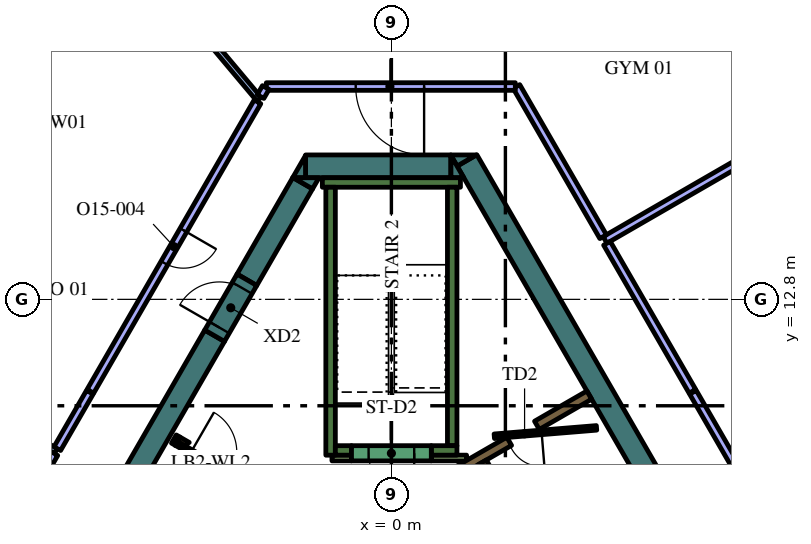
"""IFC4 building model, lengths in metres.
Left out: names, types, materials, properties, quantities, classifications, styles, units other than length and angle.
Written with IfcOpenShell. Run it as: python <this file> out.ifc"""

import sys

from ifc_helpers import new_model, si_unit, direction, frame, frame_2d, origin, place, context, subcontext, project, spatial, polyline, rectangle, outline, extrude, element, fill, save


model = new_model("IFC4")
c1 = context("Model", 3, precision=1e-05, world=origin(), true_north=direction((0.0, 1.0)))
c2 = subcontext(c1, "Body", "Model", "MODEL_VIEW")
j1 = project(units=[si_unit("LENGTHUNIT", "METRE"), si_unit("PLANEANGLEUNIT", "RADIAN")], contexts=[c1])
p1 = place(None, origin())
s1 = spatial("IfcSite", under=j1, at=p1, CompositionType="ELEMENT")
p2 = place(p1, origin())
s2 = spatial("IfcBuilding", under=s1, at=p2, CompositionType="ELEMENT")
p3 = place(p2, frame((0.0, 0.0, 317.4)))
s3 = spatial("IfcBuildingStorey", under=s2, at=p3, CompositionType="ELEMENT", Elevation=317.4)
p4 = place(p3, frame((1.989, 16.456, 0.0), z_axis=(0.0, 0.0, 1.0), x_axis=(0.49999102663, -0.8660305845, 0.0)))
e1 = element("IfcWall", 1, at=p4, inside=s3, PredefinedType="SOLIDWALL", context=c2, shape_type="SweptSolid", body=[
    extrude(rectangle(XDim=12.406, YDim=0.6, at=frame_2d((6.203, 0.0))), origin(), (0.0, 0.0, 1.0), 4.2),
])
p5 = place(p3, origin())
e2 = element("IfcWall", 2, at=p5, inside=s3, PredefinedType="SOLIDWALL", context=c2, shape_type="SweptSolid", body=[
    extrude(outline(polyline([(1.559, 16.6), (2.235, 16.6), (1.728, 16.307), (1.559, 16.6)])), origin(), (0.0, 0.0, 1.0), 4.2),
])
p6 = place(p3, frame((-2.258, 16.3, 0.0), z_axis=(0.0, 0.0, 1.0), x_axis=(1.0, 0.0, 0.0)))
e3 = element("IfcWall", 3, at=p6, inside=s3, PredefinedType="SOLIDWALL", context=c2, shape_type="SweptSolid", body=[
    extrude(rectangle(XDim=3.823, YDim=0.6, at=frame_2d((1.912, 0.0))), origin(), (0.0, 0.0, 1.0), 4.2),
])
e4 = element("IfcWall", 4, at=p5, inside=s3, PredefinedType="SOLIDWALL", context=c2, shape_type="SweptSolid", body=[
    extrude(outline(polyline([(1.905, 16.0), (1.567, 16.0), (1.567, 16.585), (1.905, 16.0)])), origin(), (0.0, 0.0, 1.0), 4.2),
])
e5 = element("IfcWall", 5, at=p5, inside=s3, PredefinedType="SOLIDWALL", context=c2, shape_type="SweptSolid", body=[
    extrude(outline(polyline([(-2.598, 16.0), (-2.26, 16.585), (-2.26, 16.0), (-2.598, 16.0)])), origin(), (0.0, 0.0, 1.0), 4.2),
])
p7 = place(p3, frame((-2.335, 15.855, 0.0), z_axis=(0.0, 0.0, 1.0), x_axis=(-0.499960127962, -0.866048422692, 0.0)))
e6 = element("IfcWall", 6, at=p7, inside=s3, PredefinedType="SOLIDWALL", context=c2, shape_type="SweptSolid", body=[
    extrude(rectangle(XDim=2.934, YDim=0.6, at=frame_2d((1.467, 0.0))), origin(), (0.0, 0.0, 1.0), 4.2),
])
e7 = element("IfcWall", 7, at=p5, inside=s3, PredefinedType="SOLIDWALL", context=c2, shape_type="SweptSolid", body=[
    extrude(outline(polyline([(-1.905, 16.0), (-2.074, 15.707), (-2.581, 16.0), (-1.905, 16.0)])), origin(), (0.0, 0.0, 1.0), 4.2),
])
p8 = place(p3, frame((-12.582, -1.892, 0.0), z_axis=(0.0, 0.0, 1.0), x_axis=(0.500003640647, 0.866023301845, 0.0)))
e8 = element("IfcWall", 8, at=p8, inside=s3, PredefinedType="SOLIDWALL", context=c2, shape_type="SweptSolid", body=[
    extrude(rectangle(XDim=15.858, YDim=0.6, at=frame_2d((7.929, 0.0))), origin(), (0.0, 0.0, 1.0), 4.2),
])
p9 = place(p3, frame((-1.817, 15.875, 0.0), z_axis=(0.0, 0.0, 1.0), x_axis=(1.0, 0.0, 0.0)))
e9 = element("IfcWall", 9, at=p9, inside=s3, PredefinedType="SOLIDWALL", context=c2, shape_type="SweptSolid", body=[
    extrude(rectangle(XDim=3.634, YDim=0.25, at=frame_2d((1.817, 0.0))), origin(), (0.0, 0.0, 1.0), 4.2),
])
p10 = place(p3, frame((1.6, 8.95, 0.0), z_axis=(0.0, 0.0, 1.0), x_axis=(0.0, 1.0, 0.0)))
e10 = element("IfcWall", 10, at=p10, inside=s3, PredefinedType="SOLIDWALL", context=c2, shape_type="SweptSolid", body=[
    extrude(rectangle(XDim=6.8, YDim=0.25, at=frame_2d((3.4, 0.0))), origin(), (0.0, 0.0, 1.0), 4.2),
])
p11 = place(p3, frame((1.05, 8.825, 0.0), z_axis=(0.0, 0.0, 1.0), x_axis=(1.0, 0.0, 0.0)))
e11 = element("IfcWall", 11, at=p11, inside=s3, PredefinedType="SOLIDWALL", context=c2, shape_type="SweptSolid", body=[
    extrude(rectangle(XDim=0.675, YDim=0.25, at=frame_2d((0.337, 0.0))), origin(), (0.0, 0.0, 1.0), 4.2),
])
p12 = place(p3, frame((-1.6, 8.7, 0.0), z_axis=(0.0, 0.0, 1.0), x_axis=(0.0, 1.0, 0.0)))
e12 = element("IfcWall", 12, at=p12, inside=s3, PredefinedType="SOLIDWALL", context=c2, shape_type="SweptSolid", body=[
    extrude(rectangle(XDim=7.05, YDim=0.25, at=frame_2d((3.525, 0.0))), origin(), (0.0, 0.0, 1.0), 4.2),
])
p13 = place(p3, frame((-1.475, 8.825, 0.0), z_axis=(0.0, 0.0, 1.0), x_axis=(1.0, 0.0, 0.0)))
e13 = element("IfcWall", 13, at=p13, inside=s3, PredefinedType="SOLIDWALL", context=c2, shape_type="SweptSolid", body=[
    extrude(rectangle(XDim=0.425, YDim=0.25, at=frame_2d((0.212, 0.0))), origin(), (0.0, 0.0, 1.0), 4.2),
])
p14 = place(p3, frame((3.1, 9.064, 0.0), z_axis=(0.0, 0.0, 1.0), x_axis=(-0.866030133475, -0.499991807846, 0.0)))
e14 = element("IfcWall", 14, at=p14, inside=s3, PredefinedType="SOLIDWALL", context=c2, shape_type="SweptSolid", body=[
    extrude(rectangle(XDim=3.217, YDim=0.25, at=frame_2d((1.608, 0.0))), origin(), (0.0, 0.0, 1.0), 4.2),
])
p15 = place(p3, frame((3.83, 9.486, 0.0), z_axis=(0.0, 0.0, 1.0), x_axis=(0.865986202621, 0.500067892261, 0.0)))
e15 = element("IfcWall", 15, at=p15, inside=s3, PredefinedType="SOLIDWALL", context=c2, shape_type="SweptSolid", body=[
    extrude(rectangle(XDim=1.591, YDim=0.25, at=frame_2d((0.795, 0.0))), origin(), (0.0, 0.0, 1.0), 4.2),
])
p16 = place(p3, frame((-5.725, 9.125, 0.0), z_axis=(0.0, 0.0, 1.0), x_axis=(0.866185586049, -0.49972245349, 0.0)))
e16 = element("IfcWall", 16, at=p16, inside=s3, PredefinedType="SOLIDWALL", context=c2, shape_type="SweptSolid", body=[
    extrude(rectangle(XDim=0.11, YDim=0.25, at=frame_2d((0.055, 0.0))), origin(), (0.0, 0.0, 1.0), 4.2),
])
e17 = element("IfcWall", 17, at=p5, inside=s3, PredefinedType="SOLIDWALL", context=c2, shape_type="SweptSolid", body=[
    extrude(outline(polyline([(-5.689, 8.96), (-5.69, 8.961), (-5.565, 9.177), (-5.319, 9.035), (-5.335, 9.026), (-5.351, 9.015), (-5.366, 9.002), (-5.379, 8.988), (-5.392, 8.972), (-5.402, 8.956), (-5.412, 8.939), (-5.629, 9.064), (-5.629, 9.064), (-5.689, 8.96)])), origin(), (0.0, 0.0, 1.0), 4.2),
])
p17 = place(p3, frame((1.05, 8.625, 0.0), z_axis=(0.0, 0.0, 1.0), x_axis=(1.0, 0.0, 0.0)))
e18 = element("IfcWall", 18, at=p17, inside=s3, PredefinedType="PARTITIONING", context=c2, shape_type="SweptSolid", body=[
    extrude(rectangle(XDim=0.929, YDim=0.15, at=frame_2d((0.464, 0.0))), origin(), (0.0, 0.0, 1.0), 3.5),
])
p18 = place(p3, frame((-1.564, 8.625, 0.0), z_axis=(0.0, 0.0, 1.0), x_axis=(1.0, 0.0, 0.0)))
e19 = element("IfcWall", 19, at=p18, inside=s3, PredefinedType="PARTITIONING", context=c2, shape_type="SweptSolid", body=[
    extrude(rectangle(XDim=0.514, YDim=0.15, at=frame_2d((0.257, 0.0))), origin(), (0.0, 0.0, 1.0), 3.5),
])
p19 = place(p3, frame((8.565, -2.185, 0.0), z_axis=(0.0, 0.0, 1.0), x_axis=(-0.499997954832, 0.866026584559, 0.0)))
e20 = element("IfcWall", 20, at=p19, inside=s3, PredefinedType="SOLIDWALL", context=c2, shape_type="SweptSolid", body=[
    extrude(rectangle(XDim=12.35, YDim=0.25, at=frame_2d((6.175, 0.0))), origin(), (0.0, 0.0, 1.0), 4.2),
])
p20 = place(p19, frame((0.685, 0.0, 0.0)))
e21 = element("IfcOpeningElement", 21, at=p20, cuts=e20, PredefinedType="OPENING", context=c2, shape_type="SweptSolid", body=[
    extrude(rectangle(XDim=0.9, YDim=2.1, at=frame_2d((0.45, 1.05))), frame((0.0, 0.135, 0.0), z_axis=(0.0, -1.0, 0.0), x_axis=(1.0, 0.0, 0.0)), (0.0, 0.0, 1.0), 0.27),
])
p21 = place(p19, frame((3.105, 0.0, 0.0)))
e22 = element("IfcOpeningElement", 22, at=p21, cuts=e20, PredefinedType="OPENING", context=c2, shape_type="SweptSolid", body=[
    extrude(rectangle(XDim=1.1, YDim=2.1, at=frame_2d((0.55, 1.05))), frame((0.0, 0.135, 0.0), z_axis=(0.0, -1.0, 0.0), x_axis=(1.0, 0.0, 0.0)), (0.0, 0.0, 1.0), 0.27),
])
p22 = place(p19, frame((5.625, 0.0, 0.0)))
e23 = element("IfcOpeningElement", 23, at=p22, cuts=e20, PredefinedType="OPENING", context=c2, shape_type="SweptSolid", body=[
    extrude(rectangle(XDim=1.1, YDim=2.1, at=frame_2d((0.55, 1.05))), frame((0.0, 0.135, 0.0), z_axis=(0.0, -1.0, 0.0), x_axis=(1.0, 0.0, 0.0)), (0.0, 0.0, 1.0), 0.27),
])
p23 = place(p19, frame((8.145, 0.0, 0.0)))
e24 = element("IfcOpeningElement", 24, at=p23, cuts=e20, PredefinedType="OPENING", context=c2, shape_type="SweptSolid", body=[
    extrude(rectangle(XDim=1.1, YDim=2.1, at=frame_2d((0.55, 1.05))), frame((0.0, 0.135, 0.0), z_axis=(0.0, -1.0, 0.0), x_axis=(1.0, 0.0, 0.0)), (0.0, 0.0, 1.0), 0.27),
])
p24 = place(p19, frame((10.665, 0.0, 0.0)))
e25 = element("IfcOpeningElement", 25, at=p24, cuts=e20, PredefinedType="OPENING", context=c2, shape_type="SweptSolid", body=[
    extrude(rectangle(XDim=1.1, YDim=2.1, at=frame_2d((0.55, 1.05))), frame((0.0, 0.135, 0.0), z_axis=(0.0, -1.0, 0.0), x_axis=(1.0, 0.0, 0.0)), (0.0, 0.0, 1.0), 0.27),
])
p25 = place(p3, frame((1.05, 8.75, 0.0), z_axis=(0.0, 0.0, 1.0), x_axis=(-1.0, 0.0, 0.0)))
e26 = element("IfcWall", 26, at=p25, inside=s3, PredefinedType="SOLIDWALL", context=c2, shape_type="SweptSolid", body=[
    extrude(rectangle(XDim=2.1, YDim=0.4, at=frame_2d((1.05, 0.0))), origin(), (0.0, 0.0, 1.0), 4.2),
])
p26 = place(p25, frame((0.45, 0.0, 0.0)))
e27 = element("IfcOpeningElement", 27, at=p26, cuts=e26, PredefinedType="OPENING", context=c2, shape_type="SweptSolid", body=[
    extrude(rectangle(XDim=1.2, YDim=2.1, at=frame_2d((0.6, 1.05))), frame((0.0, 0.21, 0.0), z_axis=(0.0, -1.0, 0.0), x_axis=(1.0, 0.0, 0.0)), (0.0, 0.0, 1.0), 0.42),
])
p27 = place(p3, frame((5.398, 9.419, 0.0), z_axis=(0.0, 0.0, 1.0), x_axis=(-0.996653416376, -0.081743303248, 0.0)))
e28 = element("IfcWall", 28, at=p27, inside=s3, PredefinedType="PARTITIONING", context=c2, shape_type="SweptSolid", body=[
    extrude(rectangle(XDim=2.7, YDim=0.12, at=frame_2d((1.35, 0.0))), origin(), (0.0, 0.0, 1.0), 3.5),
])
p28 = place(p27, frame((1.45, 0.0, 0.0)))
e29 = element("IfcOpeningElement", 29, at=p28, cuts=e28, PredefinedType="OPENING", context=c2, shape_type="SweptSolid", body=[
    extrude(rectangle(XDim=0.9, YDim=2.1, at=frame_2d((0.45, 1.05))), frame((0.0, 0.07, 0.0), z_axis=(0.0, -1.0, 0.0), x_axis=(1.0, 0.0, 0.0)), (0.0, 0.0, 1.0), 0.14),
])
p29 = place(p3, frame((-5.659, 9.012, 0.0), z_axis=(0.0, 0.0, 1.0), x_axis=(0.866009402589, -0.500027713859, 0.0)))
e30 = element("IfcWall", 30, at=p29, inside=s3, PredefinedType="PARTITIONING", context=c2, shape_type="SweptSolid", body=[
    extrude(rectangle(XDim=2.1, YDim=0.12, at=frame_2d((1.05, 0.0))), origin(), (0.0, 0.0, 1.0), 3.5),
])
p30 = place(p29, frame((0.45, 0.0, 0.0)))
e31 = element("IfcOpeningElement", 31, at=p30, cuts=e30, PredefinedType="OPENING", context=c2, shape_type="SweptSolid", body=[
    extrude(rectangle(XDim=1.2, YDim=2.1, at=frame_2d((0.6, 1.05))), frame((0.0, 0.07, 0.0), z_axis=(0.0, -1.0, 0.0), x_axis=(1.0, 0.0, 0.0)), (0.0, 0.0, 1.0), 0.14),
])
p31 = place(p3, frame((-4.652, 11.842, 0.0), z_axis=(0.0, 0.0, 1.0), x_axis=(0.500062241894, 0.865989465428, 0.0)))
e32 = element("IfcWall", 32, at=p31, inside=s3, PredefinedType="SOLIDWALL", context=c2, shape_type="SweptSolid", body=[
    extrude(rectangle(XDim=1.7, YDim=0.6, at=frame_2d((0.85, 0.0))), origin(), (0.0, 0.0, 1.0), 4.2),
])
p32 = place(p31, frame((0.25, 0.0, 0.0)))
e33 = element("IfcOpeningElement", 33, at=p32, cuts=e32, PredefinedType="OPENING", context=c2, shape_type="SweptSolid", body=[
    extrude(rectangle(XDim=1.2, YDim=2.1, at=frame_2d((0.6, 1.05))), frame((0.0, 0.31, 0.0), z_axis=(0.0, -1.0, 0.0), x_axis=(1.0, 0.0, 0.0)), (0.0, 0.0, 1.0), 0.62),
])
p33 = place(p3, frame((5.622, 14.363, 0.0), z_axis=(0.0, 0.0, 1.0), x_axis=(0.866030409726, 0.499991329354, 0.0)))
e34 = element("IfcWall", 34, at=p33, inside=s3, PredefinedType="PARTITIONING", context=c2, shape_type="SweptSolid", body=[
    extrude(rectangle(XDim=5.869, YDim=0.2, at=frame_2d((2.934, 0.0))), origin(), (0.0, 0.0, 1.0), 3.5),
])
p34 = place(p3, frame((12.936, 1.695, 0.0), z_axis=(0.0, 0.0, 1.0), x_axis=(-0.500004234368, 0.866022959057, 0.0)))
e35 = element("IfcWall", 35, at=p34, inside=s3, PredefinedType="PARTITIONING", context=c2, shape_type="SweptSolid", body=[
    extrude(rectangle(XDim=10.0, YDim=0.2, at=frame_2d((5.0, 0.0))), origin(), (0.0, 0.0, 1.0), 3.5),
])
p35 = place(p34, frame((4.1, 0.0, 0.0)))
e36 = element("IfcOpeningElement", 36, at=p35, cuts=e35, PredefinedType="OPENING", context=c2, shape_type="SweptSolid", body=[
    extrude(rectangle(XDim=1.8, YDim=2.1, at=frame_2d((0.9, 1.05))), frame((0.0, 0.11, 0.0), z_axis=(0.0, -1.0, 0.0), x_axis=(1.0, 0.0, 0.0)), (0.0, 0.0, 1.0), 0.22),
])
p36 = place(p3, frame((7.921, 10.381, 0.0), z_axis=(0.0, 0.0, 1.0), x_axis=(-0.500021625289, 0.866012918058, 0.0)))
e37 = element("IfcWall", 37, at=p36, inside=s3, PredefinedType="PARTITIONING", context=c2, shape_type="SweptSolid", body=[
    extrude(rectangle(XDim=4.497, YDim=0.2, at=frame_2d((2.249, 0.0))), origin(), (0.0, 0.0, 1.0), 3.5),
])
p37 = place(p3, frame((-3.483, 18.067, 0.0), z_axis=(0.0, 0.0, 1.0), x_axis=(-0.642968046165, 0.765893002717, 0.0)))
e38 = element("IfcWall", 38, at=p37, inside=s3, PredefinedType="PARTITIONING", context=c2, shape_type="SweptSolid", body=[
    extrude(rectangle(XDim=5.47, YDim=0.15, at=frame_2d((2.735, 0.0))), origin(), (0.0, 0.0, 1.0), 3.5),
])
p38 = place(p3, frame((5.572, 14.449, 0.0), z_axis=(0.0, 0.0, 1.0), x_axis=(-0.500012761589, 0.866018035752, 0.0)))
e39 = element("IfcWall", 39, at=p38, inside=s3, PredefinedType="PARTITIONING", context=c2, shape_type="SweptSolid", body=[
    extrude(rectangle(XDim=4.562, YDim=0.2, at=frame_2d((2.281, 0.0))), origin(), (0.0, 0.0, 1.0), 3.5),
])
p39 = place(p3, frame((3.261, 18.4, 0.0), z_axis=(0.0, 0.0, 1.0), x_axis=(-1.0, 0.0, 0.0)))
e40 = element("IfcWall", 40, at=p39, inside=s3, PredefinedType="PARTITIONING", context=c2, shape_type="SweptSolid", body=[
    extrude(rectangle(XDim=6.552, YDim=0.2, at=frame_2d((3.276, 0.0))), origin(), (0.0, 0.0, 1.0), 3.5),
])
p40 = place(p39, frame((2.4, 0.0, 0.0)))
e41 = element("IfcOpeningElement", 41, at=p40, cuts=e40, PredefinedType="OPENING", context=c2, shape_type="SweptSolid", body=[
    extrude(rectangle(XDim=1.8, YDim=2.1, at=frame_2d((0.9, 1.05))), frame((0.0, 0.11, 0.0), z_axis=(0.0, -1.0, 0.0), x_axis=(1.0, 0.0, 0.0)), (0.0, 0.0, 1.0), 0.22),
])
p41 = place(p3, frame((-3.306, 18.374, 0.0), z_axis=(0.0, 0.0, 1.0), x_axis=(-0.500055614084, -0.865993292597, 0.0)))
e42 = element("IfcWall", 42, at=p41, inside=s3, PredefinedType="PARTITIONING", context=c2, shape_type="SweptSolid", body=[
    extrude(rectangle(XDim=0.275, YDim=0.2, at=frame_2d((0.137, 0.0))), origin(), (0.0, 0.0, 1.0), 3.5),
])
p42 = place(p3, frame((-8.829, 8.808, 0.0), z_axis=(0.0, 0.0, 1.0), x_axis=(-0.86603673505, 0.499980373158, 0.0)))
e43 = element("IfcWall", 43, at=p42, inside=s3, PredefinedType="PARTITIONING", context=c2, shape_type="SweptSolid", body=[
    extrude(rectangle(XDim=6.255, YDim=0.15, at=frame_2d((3.127, 0.0))), origin(), (0.0, 0.0, 1.0), 3.5),
])
p43 = place(p3, frame((-7.936, 10.355, 0.0), z_axis=(0.0, 0.0, 1.0), x_axis=(-0.500035209441, -0.86600507465, 0.0)))
e44 = element("IfcWall", 44, at=p43, inside=s3, PredefinedType="PARTITIONING", context=c2, shape_type="SweptSolid", body=[
    extrude(rectangle(XDim=1.712, YDim=0.2, at=frame_2d((0.856, 0.0))), origin(), (0.0, 0.0, 1.0), 3.5),
])
p44 = place(p3, frame((-3.523, 17.998, 0.0), z_axis=(0.0, 0.0, 1.0), x_axis=(-0.499996383721, -0.866027491634, 0.0)))
e45 = element("IfcWall", 45, at=p44, inside=s3, PredefinedType="PARTITIONING", context=c2, shape_type="SweptSolid", body=[
    extrude(rectangle(XDim=8.795, YDim=0.2, at=frame_2d((4.397, 0.0))), origin(), (0.0, 0.0, 1.0), 3.5),
])
p45 = place(p44, frame((3.9, 0.0, 0.0)))
e46 = element("IfcOpeningElement", 46, at=p45, cuts=e45, PredefinedType="OPENING", context=c2, shape_type="SweptSolid", body=[
    extrude(rectangle(XDim=1.0, YDim=2.1, at=frame_2d((0.5, 1.05))), frame((0.0, 0.11, 0.0), z_axis=(0.0, -1.0, 0.0), x_axis=(1.0, 0.0, 0.0)), (0.0, 0.0, 1.0), 0.22),
])
p46 = place(p3, frame((-8.867, 8.743, 0.0), z_axis=(0.0, 0.0, 1.0), x_axis=(-0.499978679558, -0.866037712797, 0.0)))
e47 = element("IfcWall", 47, at=p46, inside=s3, PredefinedType="PARTITIONING", context=c2, shape_type="SweptSolid", body=[
    extrude(rectangle(XDim=8.138, YDim=0.2, at=frame_2d((4.069, 0.0))), origin(), (0.0, 0.0, 1.0), 3.5),
])
p47 = place(p46, frame((3.6, 0.0, 0.0)))
e48 = element("IfcOpeningElement", 48, at=p47, cuts=e47, PredefinedType="OPENING", context=c2, shape_type="SweptSolid", body=[
    extrude(rectangle(XDim=1.0, YDim=2.1, at=frame_2d((0.5, 1.05))), frame((0.0, 0.11, 0.0), z_axis=(0.0, -1.0, 0.0), x_axis=(1.0, 0.0, 0.0)), (0.0, 0.0, 1.0), 0.22),
])
p48 = place(p3, frame((10.938, 17.99, 0.0), z_axis=(0.0, 0.0, 1.0), x_axis=(-0.599559865294, 0.800329911929, 0.0)))
e49 = element("IfcWall", 49, at=p48, inside=s3, PredefinedType="SOLIDWALL", context=c2, shape_type="SweptSolid", body=[
    extrude(rectangle(XDim=5.415, YDim=0.19, at=frame_2d((2.708, 0.0))), origin(), (0.0, 0.0, 1.0), 3.9),
])
p49 = place(p48, frame((0.358, 0.0, 0.6)))
e50 = element("IfcOpeningElement", 50, at=p49, cuts=e49, PredefinedType="OPENING", context=c2, shape_type="SweptSolid", body=[
    extrude(rectangle(XDim=1.5, YDim=2.85, at=frame_2d((0.75, 1.425))), frame((0.0, 0.105, 0.0), z_axis=(0.0, -1.0, 0.0), x_axis=(1.0, 0.0, 0.0)), (0.0, 0.0, 1.0), 0.21),
])
p50 = place(p48, frame((3.593, 0.0, 0.6)))
e51 = element("IfcOpeningElement", 51, at=p50, cuts=e49, PredefinedType="OPENING", context=c2, shape_type="SweptSolid", body=[
    extrude(rectangle(XDim=1.5, YDim=2.85, at=frame_2d((0.75, 1.425))), frame((0.0, 0.105, 0.0), z_axis=(0.0, -1.0, 0.0), x_axis=(1.0, 0.0, 0.0)), (0.0, 0.0, 1.0), 0.21),
])
p51 = place(p3, frame((-7.692, 22.324, 0.0), z_axis=(0.0, 0.0, 1.0), x_axis=(-0.599559865294, -0.800329911929, 0.0)))
e52 = element("IfcWall", 52, at=p51, inside=s3, PredefinedType="SOLIDWALL", context=c2, shape_type="SweptSolid", body=[
    extrude(rectangle(XDim=5.415, YDim=0.19, at=frame_2d((2.708, 0.0))), origin(), (0.0, 0.0, 1.0), 3.9),
])
p52 = place(p51, frame((0.323, 0.0, 0.6)))
e53 = element("IfcOpeningElement", 53, at=p52, cuts=e52, PredefinedType="OPENING", context=c2, shape_type="SweptSolid", body=[
    extrude(rectangle(XDim=1.5, YDim=2.85, at=frame_2d((0.75, 1.425))), frame((0.0, 0.105, 0.0), z_axis=(0.0, -1.0, 0.0), x_axis=(1.0, 0.0, 0.0)), (0.0, 0.0, 1.0), 0.21),
])
p53 = place(p51, frame((3.558, 0.0, 0.6)))
e54 = element("IfcOpeningElement", 54, at=p53, cuts=e52, PredefinedType="OPENING", context=c2, shape_type="SweptSolid", body=[
    extrude(rectangle(XDim=1.5, YDim=2.85, at=frame_2d((0.75, 1.425))), frame((0.0, 0.105, 0.0), z_axis=(0.0, -1.0, 0.0), x_axis=(1.0, 0.0, 0.0)), (0.0, 0.0, 1.0), 0.21),
])
p54 = place(p26, origin())
e55 = element("IfcDoor", 55, at=p54, inside=s3, OperationType="SINGLE_SWING_LEFT", PredefinedType="DOOR", context=c2, shape_type="SweptSolid", body=[
    extrude(rectangle(XDim=1.2, YDim=2.1, at=frame_2d((0.6, 1.05))), frame((0.0, 0.025, 0.0), z_axis=(0.0, -1.0, 0.0), x_axis=(1.0, 0.0, 0.0)), (0.0, 0.0, 1.0), 0.05),
])
fill(e27, e55)
p55 = place(p28, origin())
e56 = element("IfcDoor", 56, at=p55, inside=s3, OperationType="SINGLE_SWING_LEFT", PredefinedType="DOOR", context=c2, shape_type="SweptSolid", body=[
    extrude(rectangle(XDim=0.9, YDim=2.1, at=frame_2d((0.45, 1.05))), frame((0.0, 0.025, 0.0), z_axis=(0.0, -1.0, 0.0), x_axis=(1.0, 0.0, 0.0)), (0.0, 0.0, 1.0), 0.05),
])
fill(e29, e56)
p56 = place(p30, origin())
e57 = element("IfcDoor", 57, at=p56, inside=s3, OperationType="SINGLE_SWING_LEFT", PredefinedType="DOOR", context=c2, shape_type="SweptSolid", body=[
    extrude(rectangle(XDim=1.2, YDim=2.1, at=frame_2d((0.6, 1.05))), frame((0.0, 0.025, 0.0), z_axis=(0.0, -1.0, 0.0), x_axis=(1.0, 0.0, 0.0)), (0.0, 0.0, 1.0), 0.05),
])
fill(e31, e57)
p57 = place(p32, origin())
e58 = element("IfcDoor", 58, at=p57, inside=s3, OperationType="SINGLE_SWING_LEFT", PredefinedType="DOOR", context=c2, shape_type="SweptSolid", body=[
    extrude(rectangle(XDim=1.2, YDim=2.1, at=frame_2d((0.6, 1.05))), frame((0.0, 0.025, 0.0), z_axis=(0.0, -1.0, 0.0), x_axis=(1.0, 0.0, 0.0)), (0.0, 0.0, 1.0), 0.05),
])
fill(e33, e58)
p58 = place(p40, origin())
e59 = element("IfcDoor", 59, at=p58, inside=s3, OperationType="DOUBLE_DOOR_SINGLE_SWING", PredefinedType="DOOR", context=c2, shape_type="SweptSolid", body=[
    extrude(rectangle(XDim=1.8, YDim=2.1, at=frame_2d((0.9, 1.05))), frame((0.0, 0.025, 0.0), z_axis=(0.0, -1.0, 0.0), x_axis=(1.0, 0.0, 0.0)), (0.0, 0.0, 1.0), 0.05),
])
fill(e41, e59)
p59 = place(p45, origin())
e60 = element("IfcDoor", 60, at=p59, inside=s3, OperationType="SINGLE_SWING_RIGHT", PredefinedType="DOOR", context=c2, shape_type="SweptSolid", body=[
    extrude(rectangle(XDim=1.0, YDim=2.1, at=frame_2d((0.5, 1.05))), frame((0.0, 0.025, 0.0), z_axis=(0.0, -1.0, 0.0), x_axis=(1.0, 0.0, 0.0)), (0.0, 0.0, 1.0), 0.05),
])
fill(e46, e60)
save(model, sys.argv[1])
